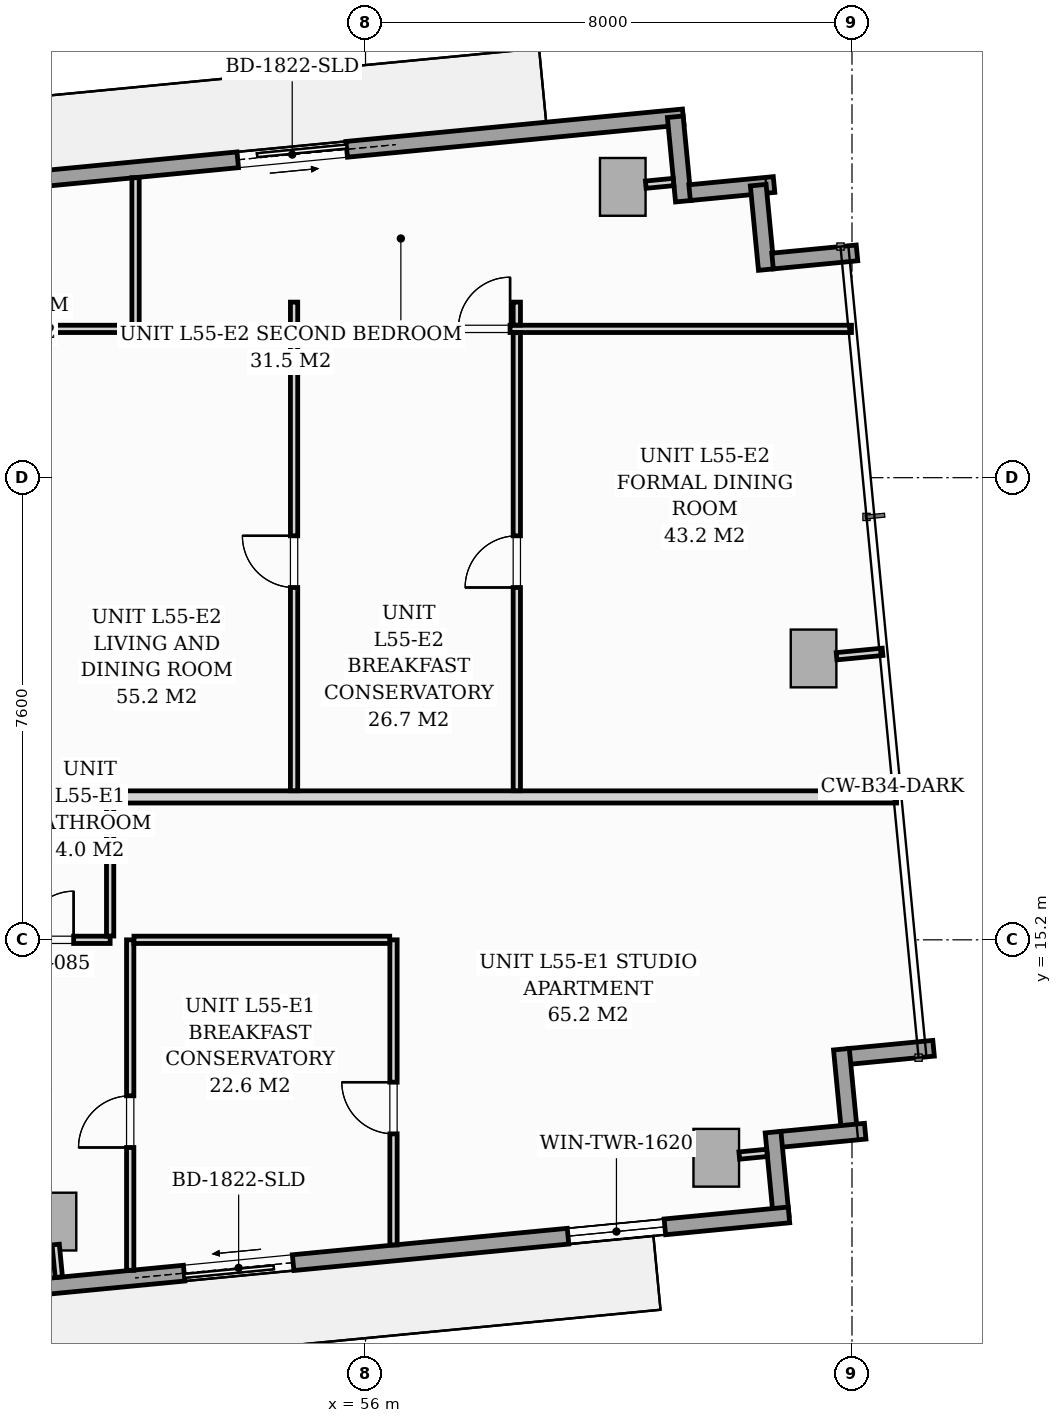
"""IFC4 building model, lengths in metres.
Left out: names, types, materials, properties, quantities, classifications, styles, units other than length and angle.
Written with IfcOpenShell. Run it as: python <this file> out.ifc"""

import sys

from ifc_helpers import new_model, si_unit, direction, frame, frame_2d, origin, origin_2d, place, context, subcontext, project, spatial, rectangle, extrude, source, transform, mapped, element, fill, save


model = new_model("IFC4")
c1 = context("Model", 3, precision=1e-05, world=origin(), true_north=direction((0.0, 1.0)))
c2 = subcontext(c1, "Body", "Model", "MODEL_VIEW")
j1 = project(units=[si_unit("LENGTHUNIT", "METRE"), si_unit("PLANEANGLEUNIT", "RADIAN")], contexts=[c1])
p1 = place(None, origin())
s1 = spatial("IfcSite", under=j1, at=p1, CompositionType="ELEMENT")
p2 = place(p1, origin())
s2 = spatial("IfcBuilding", under=s1, at=p2, CompositionType="ELEMENT")
p3 = place(p2, frame((0.0, 0.0, 192.2)))
s3 = spatial("IfcBuildingStorey", under=s2, at=p3, CompositionType="ELEMENT", Elevation=192.2)
m1 = source(origin(), c2, "Body", "SweptSolid", [
    extrude(rectangle(XDim=0.75, YDim=0.95, at=origin_2d()), origin(), (0.0, 0.0, 1.0), 3.196),
])
for number, where, z_axis, x_axis in (
    (1, (50.868, 10.566, 0.002), (0.0, 0.0, 1.0), (0.995, 0.096, 0.0)),
    (2, (61.768, 11.616, 0.002), (0.0, 0.0, 1.0), (0.995, 0.096, 0.0)),
    (3, (60.23, 27.582, 0.002), (0.0, 0.0, 1.0), (0.995, 0.096, 0.0)),
    (4, (63.368, 19.827, 0.002), (0.0, 0.0, 1.0), (0.995, 0.096, 0.0)),
):
    element("IfcColumn", number, at=place(p3, frame(where, z_axis=z_axis, x_axis=x_axis)), inside=s3, PredefinedType="COLUMN", context=c2, shape_type="MappedRepresentation", body=[
        mapped(m1, transform((0.0, 0.0, 0.0), scale=1.0)),
    ])
p4 = place(p3, frame((45.199, 27.19, 0.0), z_axis=(0.0, 0.0, 1.0), x_axis=(0.995397074604, 0.095836652014, 0.0)))
e5 = element("IfcWall", 5, at=p4, inside=s3, PredefinedType="STANDARD", context=c2, shape_type="SweptSolid", body=[
    extrude(rectangle(XDim=16.1, YDim=0.26, at=frame_2d((8.05, 0.0))), origin(), (0.0, 0.0, 1.0), 2.94),
])
p5 = place(p4, frame((8.74, 0.0, 0.0)))
e6 = element("IfcOpeningElement", 6, at=p5, cuts=e5, PredefinedType="OPENING", context=c2, shape_type="SweptSolid", body=[
    extrude(rectangle(XDim=1.8, YDim=2.06, at=frame_2d((0.9, 1.03))), frame((0.0, 0.14, 0.0), z_axis=(0.0, -1.0, 0.0), x_axis=(1.0, 0.0, 0.0)), (0.0, 0.0, 1.0), 0.28),
])
p6 = place(p4, frame((0.7, 0.0, 0.65)))
e7 = element("IfcOpeningElement", 7, at=p6, cuts=e5, PredefinedType="OPENING", context=c2, shape_type="SweptSolid", body=[
    extrude(rectangle(XDim=1.6, YDim=1.5, at=frame_2d((0.8, 0.75))), frame((0.0, 0.14, 0.0), z_axis=(0.0, -1.0, 0.0), x_axis=(1.0, 0.0, 0.0)), (0.0, 0.0, 1.0), 0.28),
])
p7 = place(p3, frame((61.094, 28.735, 0.0), z_axis=(0.0, 0.0, 1.0), x_axis=(0.095742423056, -0.99540614245, 0.0)))
e8 = element("IfcWall", 8, at=p7, inside=s3, PredefinedType="STANDARD", context=c2, shape_type="SweptSolid", body=[
    extrude(rectangle(XDim=1.395, YDim=0.26, at=frame_2d((0.697, 0.0))), origin(), (0.0, 0.0, 1.0), 2.94),
])
p8 = place(p3, frame((61.33, 27.487, 0.0), z_axis=(0.0, 0.0, 1.0), x_axis=(0.995391056452, 0.09589913835, 0.0)))
e9 = element("IfcWall", 9, at=p8, inside=s3, PredefinedType="STANDARD", context=c2, shape_type="SweptSolid", body=[
    extrude(rectangle(XDim=1.395, YDim=0.26, at=frame_2d((0.698, 0.0))), origin(), (0.0, 0.0, 1.0), 2.94),
])
for number, where, z_axis, x_axis in (
    (10, (62.458, 27.611, 0.0), (0.0, 0.0, 1.0), (0.096, -0.995, 0.0)),
    (11, (62.694, 26.363, 0.0), (0.0, 0.0, 1.0), (0.995, 0.096, 0.0)),
):
    element("IfcWall", number, at=place(p3, frame(where, z_axis=z_axis, x_axis=x_axis)), inside=s3, PredefinedType="STANDARD", context=c2, shape_type="SweptSolid", body=[
        extrude(rectangle(XDim=1.395, YDim=0.26, at=frame_2d((0.697, 0.0))), origin(), (0.0, 0.0, 1.0), 2.94),
    ])
p9 = place(p3, frame((65.342, 13.417, 0.0), z_axis=(0.0, 0.0, 1.0), x_axis=(-0.99540774648, -0.095725744959, 0.0)))
e12 = element("IfcWall", 12, at=p9, inside=s3, PredefinedType="STANDARD", context=c2, shape_type="SweptSolid", body=[
    extrude(rectangle(XDim=1.395, YDim=0.26, at=frame_2d((0.698, 0.0))), origin(), (0.0, 0.0, 1.0), 2.94),
])
p10 = place(p3, frame((63.826, 13.401, 0.0), z_axis=(0.0, 0.0, 1.0), x_axis=(0.095915846097, -0.995389446633, 0.0)))
e13 = element("IfcWall", 13, at=p10, inside=s3, PredefinedType="STANDARD", context=c2, shape_type="SweptSolid", body=[
    extrude(rectangle(XDim=1.395, YDim=0.26, at=frame_2d((0.697, 0.0))), origin(), (0.0, 0.0, 1.0), 2.94),
])
for number, where, z_axis, x_axis in (
    (14, (64.217, 12.053, 0.0), (0.0, 0.0, 1.0), (-0.995, -0.096, 0.0)),
    (15, (62.702, 12.037, 0.0), (0.0, 0.0, 1.0), (0.096, -0.995, 0.0)),
):
    element("IfcWall", number, at=place(p3, frame(where, z_axis=z_axis, x_axis=x_axis)), inside=s3, PredefinedType="STANDARD", context=c2, shape_type="SweptSolid", body=[
        extrude(rectangle(XDim=1.395, YDim=0.26, at=frame_2d((0.698, 0.0))), origin(), (0.0, 0.0, 1.0), 2.94),
    ])
p11 = place(p3, frame((62.963, 10.676, 0.0), z_axis=(0.0, 0.0, 1.0), x_axis=(-0.995395627913, -0.095851676732, 0.0)))
e16 = element("IfcWall", 16, at=p11, inside=s3, PredefinedType="STANDARD", context=c2, shape_type="SweptSolid", body=[
    extrude(rectangle(XDim=16.1, YDim=0.26, at=frame_2d((8.05, 0.0))), origin(), (0.0, 0.0, 1.0), 2.94),
])
p12 = place(p11, frame((8.192, 0.0, 0.0)))
e17 = element("IfcOpeningElement", 17, at=p12, cuts=e16, PredefinedType="OPENING", context=c2, shape_type="SweptSolid", body=[
    extrude(rectangle(XDim=1.8, YDim=2.06, at=frame_2d((0.9, 1.03))), frame((0.0, 0.14, 0.0), z_axis=(0.0, -1.0, 0.0), x_axis=(1.0, 0.0, 0.0)), (0.0, 0.0, 1.0), 0.28),
])
p13 = place(p11, frame((2.05, 0.0, 0.65)))
e18 = element("IfcOpeningElement", 18, at=p13, cuts=e16, PredefinedType="OPENING", context=c2, shape_type="SweptSolid", body=[
    extrude(rectangle(XDim=1.6, YDim=1.5, at=frame_2d((0.8, 0.75))), frame((0.0, 0.14, 0.0), z_axis=(0.0, -1.0, 0.0), x_axis=(1.0, 0.0, 0.0)), (0.0, 0.0, 1.0), 0.28),
])
p14 = place(p3, frame((47.532, 17.55, 0.0), z_axis=(0.0, 0.0, 1.0), x_axis=(1.0, 0.0, 0.0)))
e19 = element("IfcWall", 19, at=p14, inside=s3, PredefinedType="PARTITIONING", context=c2, shape_type="SweptSolid", body=[
    extrude(rectangle(XDim=17.201, YDim=0.2, at=frame_2d((8.601, 0.0))), origin(), (0.0, 0.0, 1.0), 2.281),
])
p15 = place(p3, frame((47.6, 15.2, 0.0), z_axis=(0.0, 0.0, 1.0), x_axis=(1.0, 0.0, 0.0)))
e20 = element("IfcWall", 20, at=p15, inside=s3, PredefinedType="PARTITIONING", context=c2, shape_type="SweptSolid", body=[
    extrude(rectangle(XDim=4.2, YDim=0.12, at=frame_2d((2.1, 0.0))), origin(), (0.0, 0.0, 1.0), 2.94),
])
p16 = place(p15, frame((0.675, 0.0, 0.0)))
e21 = element("IfcOpeningElement", 21, at=p16, cuts=e20, PredefinedType="OPENING", context=c2, shape_type="SweptSolid", body=[
    extrude(rectangle(XDim=0.85, YDim=2.05, at=frame_2d((0.425, 1.025))), frame((0.0, 0.07, 0.0), z_axis=(0.0, -1.0, 0.0), x_axis=(1.0, 0.0, 0.0)), (0.0, 0.0, 1.0), 0.14),
])
p17 = place(p15, frame((2.8, 0.0, 0.0)))
e22 = element("IfcOpeningElement", 22, at=p17, cuts=e20, PredefinedType="OPENING", context=c2, shape_type="SweptSolid", body=[
    extrude(rectangle(XDim=0.8, YDim=2.02, at=frame_2d((0.4, 1.01))), frame((0.0, 0.07, 0.0), z_axis=(0.0, -1.0, 0.0), x_axis=(1.0, 0.0, 0.0)), (0.0, 0.0, 1.0), 0.14),
])
p18 = place(p3, frame((51.8, 15.262, 0.0), z_axis=(0.0, 0.0, 1.0), x_axis=(0.0, 1.0, 0.0)))
e23 = element("IfcWall", 23, at=p18, inside=s3, PredefinedType="PARTITIONING", context=c2, shape_type="SweptSolid", body=[
    extrude(rectangle(XDim=2.186, YDim=0.12, at=frame_2d((1.093, 0.0))), origin(), (0.0, 0.0, 1.0), 2.94),
])
p19 = place(p3, frame((52.13, 9.766, 0.0), z_axis=(0.0, 0.0, 1.0), x_axis=(0.0, 1.0, 0.0)))
e24 = element("IfcWall", 24, at=p19, inside=s3, PredefinedType="PARTITIONING", context=c2, shape_type="SweptSolid", body=[
    extrude(rectangle(XDim=5.434, YDim=0.12, at=frame_2d((2.717, 0.0))), origin(), (0.0, 0.0, 1.0), 2.94),
])
p20 = place(p19, frame((2.019, 0.0, 0.0)))
e25 = element("IfcOpeningElement", 25, at=p20, cuts=e24, PredefinedType="OPENING", context=c2, shape_type="SweptSolid", body=[
    extrude(rectangle(XDim=0.85, YDim=2.05, at=frame_2d((0.425, 1.025))), frame((0.0, 0.07, 0.0), z_axis=(0.0, -1.0, 0.0), x_axis=(1.0, 0.0, 0.0)), (0.0, 0.0, 1.0), 0.14),
])
p21 = place(p3, frame((56.46, 10.183, 0.0), z_axis=(0.0, 0.0, 1.0), x_axis=(0.0, 1.0, 0.0)))
e26 = element("IfcWall", 26, at=p21, inside=s3, PredefinedType="PARTITIONING", context=c2, shape_type="SweptSolid", body=[
    extrude(rectangle(XDim=5.017, YDim=0.12, at=frame_2d((2.509, 0.0))), origin(), (0.0, 0.0, 1.0), 2.94),
])
p22 = place(p21, frame((1.826, 0.0, 0.0)))
e27 = element("IfcOpeningElement", 27, at=p22, cuts=e26, PredefinedType="OPENING", context=c2, shape_type="SweptSolid", body=[
    extrude(rectangle(XDim=0.85, YDim=2.05, at=frame_2d((0.425, 1.025))), frame((0.0, 0.07, 0.0), z_axis=(0.0, -1.0, 0.0), x_axis=(1.0, 0.0, 0.0)), (0.0, 0.0, 1.0), 0.14),
])
p23 = place(p3, frame((52.192, 15.2, 0.0), z_axis=(0.0, 0.0, 1.0), x_axis=(1.0, 0.0, 0.0)))
e28 = element("IfcWall", 28, at=p23, inside=s3, PredefinedType="PARTITIONING", context=c2, shape_type="SweptSolid", body=[
    extrude(rectangle(XDim=4.206, YDim=0.12, at=frame_2d((2.103, 0.0))), origin(), (0.0, 0.0, 1.0), 2.94),
])
p24 = place(p3, frame((52.218, 25.247, 0.0), z_axis=(0.0, 0.0, 1.0), x_axis=(0.0, 1.0, 0.0)))
e29 = element("IfcWall", 29, at=p24, inside=s3, PredefinedType="PARTITIONING", context=c2, shape_type="SweptSolid", body=[
    extrude(rectangle(XDim=2.486, YDim=0.12, at=frame_2d((1.243, 0.0))), origin(), (0.0, 0.0, 1.0), 2.94),
])
p25 = place(p3, frame((40.412, 25.247, 0.0), z_axis=(0.0, 0.0, 1.0), x_axis=(1.0, 0.0, 0.0)))
e30 = element("IfcWall", 30, at=p25, inside=s3, PredefinedType="PARTITIONING", context=c2, shape_type="SweptSolid", body=[
    extrude(rectangle(XDim=11.744, YDim=0.12, at=frame_2d((5.872, 0.0))), origin(), (0.0, 0.0, 1.0), 2.94),
])
p26 = place(p25, frame((6.1, 0.0, 0.0)))
e31 = element("IfcOpeningElement", 31, at=p26, cuts=e30, PredefinedType="OPENING", context=c2, shape_type="SweptSolid", body=[
    extrude(rectangle(XDim=0.85, YDim=2.05, at=frame_2d((0.425, 1.025))), frame((0.0, 0.07, 0.0), z_axis=(0.0, -1.0, 0.0), x_axis=(1.0, 0.0, 0.0)), (0.0, 0.0, 1.0), 0.14),
])
p27 = place(p3, frame((52.28, 25.247, 0.0), z_axis=(0.0, 0.0, 1.0), x_axis=(1.0, 0.0, 0.0)))
e32 = element("IfcWall", 32, at=p27, inside=s3, PredefinedType="PARTITIONING", context=c2, shape_type="SweptSolid", body=[
    extrude(rectangle(XDim=11.712, YDim=0.12, at=frame_2d((5.856, 0.0))), origin(), (0.0, 0.0, 1.0), 2.94),
])
p28 = place(p27, frame((5.247, 0.0, 0.0)))
e33 = element("IfcOpeningElement", 33, at=p28, cuts=e32, PredefinedType="OPENING", context=c2, shape_type="SweptSolid", body=[
    extrude(rectangle(XDim=0.85, YDim=2.05, at=frame_2d((0.425, 1.025))), frame((0.0, 0.07, 0.0), z_axis=(0.0, -1.0, 0.0), x_axis=(1.0, 0.0, 0.0)), (0.0, 0.0, 1.0), 0.14),
])
p29 = place(p3, frame((58.488, 17.652, 0.0), z_axis=(0.0, 0.0, 1.0), x_axis=(0.0, 1.0, 0.0)))
e34 = element("IfcWall", 34, at=p29, inside=s3, PredefinedType="PARTITIONING", context=c2, shape_type="SweptSolid", body=[
    extrude(rectangle(XDim=7.533, YDim=0.12, at=frame_2d((3.767, 0.0))), origin(), (0.0, 0.0, 1.0), 2.94),
])
p30 = place(p29, frame((3.342, 0.0, 0.0)))
e35 = element("IfcOpeningElement", 35, at=p30, cuts=e34, PredefinedType="OPENING", context=c2, shape_type="SweptSolid", body=[
    extrude(rectangle(XDim=0.85, YDim=2.05, at=frame_2d((0.425, 1.025))), frame((0.0, 0.07, 0.0), z_axis=(0.0, -1.0, 0.0), x_axis=(1.0, 0.0, 0.0)), (0.0, 0.0, 1.0), 0.14),
])
p31 = place(p3, frame((58.488, 25.309, 0.0), z_axis=(0.0, 0.0, 1.0), x_axis=(0.0, 1.0, 0.0)))
e36 = element("IfcWall", 36, at=p31, inside=s3, PredefinedType="PARTITIONING", context=c2, shape_type="SweptSolid", body=[
    extrude(rectangle(XDim=0.378, YDim=0.12, at=frame_2d((0.189, 0.0))), origin(), (0.0, 0.0, 1.0), 2.94),
])
p32 = place(p3, frame((54.825, 17.652, 0.0), z_axis=(0.0, 0.0, 1.0), x_axis=(0.0, 1.0, 0.0)))
e37 = element("IfcWall", 37, at=p32, inside=s3, PredefinedType="PARTITIONING", context=c2, shape_type="SweptSolid", body=[
    extrude(rectangle(XDim=7.533, YDim=0.12, at=frame_2d((3.767, 0.0))), origin(), (0.0, 0.0, 1.0), 2.94),
])
p33 = place(p32, frame((3.342, 0.0, 0.0)))
e38 = element("IfcOpeningElement", 38, at=p33, cuts=e37, PredefinedType="OPENING", context=c2, shape_type="SweptSolid", body=[
    extrude(rectangle(XDim=0.85, YDim=2.05, at=frame_2d((0.425, 1.025))), frame((0.0, 0.07, 0.0), z_axis=(0.0, -1.0, 0.0), x_axis=(1.0, 0.0, 0.0)), (0.0, 0.0, 1.0), 0.14),
])
p34 = place(p3, frame((54.825, 25.309, 0.0), z_axis=(0.0, 0.0, 1.0), x_axis=(0.0, 1.0, 0.0)))
e39 = element("IfcWall", 39, at=p34, inside=s3, PredefinedType="PARTITIONING", context=c2, shape_type="SweptSolid", body=[
    extrude(rectangle(XDim=0.378, YDim=0.12, at=frame_2d((0.189, 0.0))), origin(), (0.0, 0.0, 1.0), 2.94),
])
p35 = place(p3, frame((50.905, 10.188, 0.0), z_axis=(0.0, 0.0, 1.0), x_axis=(0.095772948675, -0.995403205893, 0.0)))
e40 = element("IfcWall", 40, at=p35, inside=s3, PredefinedType="PARTITIONING", context=c2, shape_type="SweptSolid", body=[
    extrude(rectangle(XDim=0.538, YDim=0.12, at=frame_2d((0.269, 0.0))), origin(), (0.0, 0.0, 1.0), 2.94),
])
for number, where, z_axis, x_axis in (
    (41, (62.146, 11.652, 0.0), (0.0, 0.0, 1.0), (0.995, 0.096, 0.0)),
    (42, (60.609, 27.618, 0.0), (0.0, 0.0, 1.0), (0.995, 0.096, 0.0)),
):
    element("IfcWall", number, at=place(p3, frame(where, z_axis=z_axis, x_axis=x_axis)), inside=s3, PredefinedType="PARTITIONING", context=c2, shape_type="SweptSolid", body=[
        extrude(rectangle(XDim=0.458, YDim=0.12, at=frame_2d((0.229, 0.0))), origin(), (0.0, 0.0, 1.0), 2.94),
    ])
p36 = place(p3, frame((63.747, 19.864, 0.0), z_axis=(0.0, 0.0, 1.0), x_axis=(0.995405496295, 0.095749140702, 0.0)))
e43 = element("IfcWall", 43, at=p36, inside=s3, PredefinedType="PARTITIONING", context=c2, shape_type="SweptSolid", body=[
    extrude(rectangle(XDim=0.76, YDim=0.12, at=frame_2d((0.38, 0.0))), origin(), (0.0, 0.0, 1.0), 2.94),
])
m2 = source(origin(), c2, "Body", "SweptSolid", [
    extrude(rectangle(XDim=1.8, YDim=2.06, at=frame_2d((0.9, 1.03))), frame((0.0, 0.025, 0.0), z_axis=(0.0, -1.0, 0.0), x_axis=(1.0, 0.0, 0.0)), (0.0, 0.0, 1.0), 0.05),
])
p37 = place(p5, origin())
e44 = element("IfcDoor", 44, at=p37, inside=s3, OperationType="SLIDING_TO_RIGHT", PredefinedType="DOOR", context=c2, shape_type="MappedRepresentation", body=[
    mapped(m2, transform((0.0, 0.0, 0.0), scale=1.0)),
])
fill(e6, e44)
p38 = place(p12, origin())
e45 = element("IfcDoor", 45, at=p38, inside=s3, OperationType="SLIDING_TO_RIGHT", PredefinedType="DOOR", context=c2, shape_type="MappedRepresentation", body=[
    mapped(m2, transform((0.0, 0.0, 0.0), scale=1.0)),
])
fill(e17, e45)
m3 = source(origin(), c2, "Body", "SweptSolid", [
    extrude(rectangle(XDim=1.6, YDim=1.5, at=frame_2d((0.8, 0.75))), frame((0.0, 0.03, 0.0), z_axis=(0.0, -1.0, 0.0), x_axis=(1.0, 0.0, 0.0)), (0.0, 0.0, 1.0), 0.06),
])
p39 = place(p13, origin())
e46 = element("IfcWindow", 46, at=p39, inside=s3, PartitioningType="SINGLE_PANEL", PredefinedType="WINDOW", context=c2, shape_type="MappedRepresentation", body=[
    mapped(m3, transform((0.0, 0.0, 0.0), scale=1.0)),
])
fill(e18, e46)
m4 = source(origin(), c2, "Body", "SweptSolid", [
    extrude(rectangle(XDim=0.85, YDim=2.05, at=frame_2d((0.425, 1.025))), frame((0.0, 0.025, 0.0), z_axis=(0.0, -1.0, 0.0), x_axis=(1.0, 0.0, 0.0)), (0.0, 0.0, 1.0), 0.05),
])
p40 = place(p20, origin())
e47 = element("IfcDoor", 47, at=p40, inside=s3, OperationType="SINGLE_SWING_LEFT", PredefinedType="DOOR", context=c2, shape_type="MappedRepresentation", body=[
    mapped(m4, transform((0.0, 0.0, 0.0), scale=1.0)),
])
fill(e25, e47)
p41 = place(p22, origin())
e48 = element("IfcDoor", 48, at=p41, inside=s3, OperationType="SINGLE_SWING_RIGHT", PredefinedType="DOOR", context=c2, shape_type="MappedRepresentation", body=[
    mapped(m4, transform((0.0, 0.0, 0.0), scale=1.0)),
])
fill(e27, e48)
m5 = source(origin(), c2, "Body", "SweptSolid", [
    extrude(rectangle(XDim=0.8, YDim=2.02, at=frame_2d((0.4, 1.01))), frame((0.0, 0.025, 0.0), z_axis=(0.0, -1.0, 0.0), x_axis=(1.0, 0.0, 0.0)), (0.0, 0.0, 1.0), 0.05),
])
p42 = place(p17, origin())
e49 = element("IfcDoor", 49, at=p42, inside=s3, OperationType="SINGLE_SWING_RIGHT", PredefinedType="DOOR", context=c2, shape_type="MappedRepresentation", body=[
    mapped(m5, transform((0.0, 0.0, 0.0), scale=1.0)),
])
fill(e22, e49)
p43 = place(p28, origin())
e50 = element("IfcDoor", 50, at=p43, inside=s3, OperationType="SINGLE_SWING_RIGHT", PredefinedType="DOOR", context=c2, shape_type="MappedRepresentation", body=[
    mapped(m4, transform((0.0, 0.0, 0.0), scale=1.0)),
])
fill(e33, e50)
p44 = place(p30, origin())
e51 = element("IfcDoor", 51, at=p44, inside=s3, OperationType="SINGLE_SWING_LEFT", PredefinedType="DOOR", context=c2, shape_type="MappedRepresentation", body=[
    mapped(m4, transform((0.0, 0.0, 0.0), scale=1.0)),
])
fill(e35, e51)
p45 = place(p33, origin())
e52 = element("IfcDoor", 52, at=p45, inside=s3, OperationType="SINGLE_SWING_RIGHT", PredefinedType="DOOR", context=c2, shape_type="MappedRepresentation", body=[
    mapped(m4, transform((0.0, 0.0, 0.0), scale=1.0)),
])
fill(e38, e52)
save(model, sys.argv[1])
